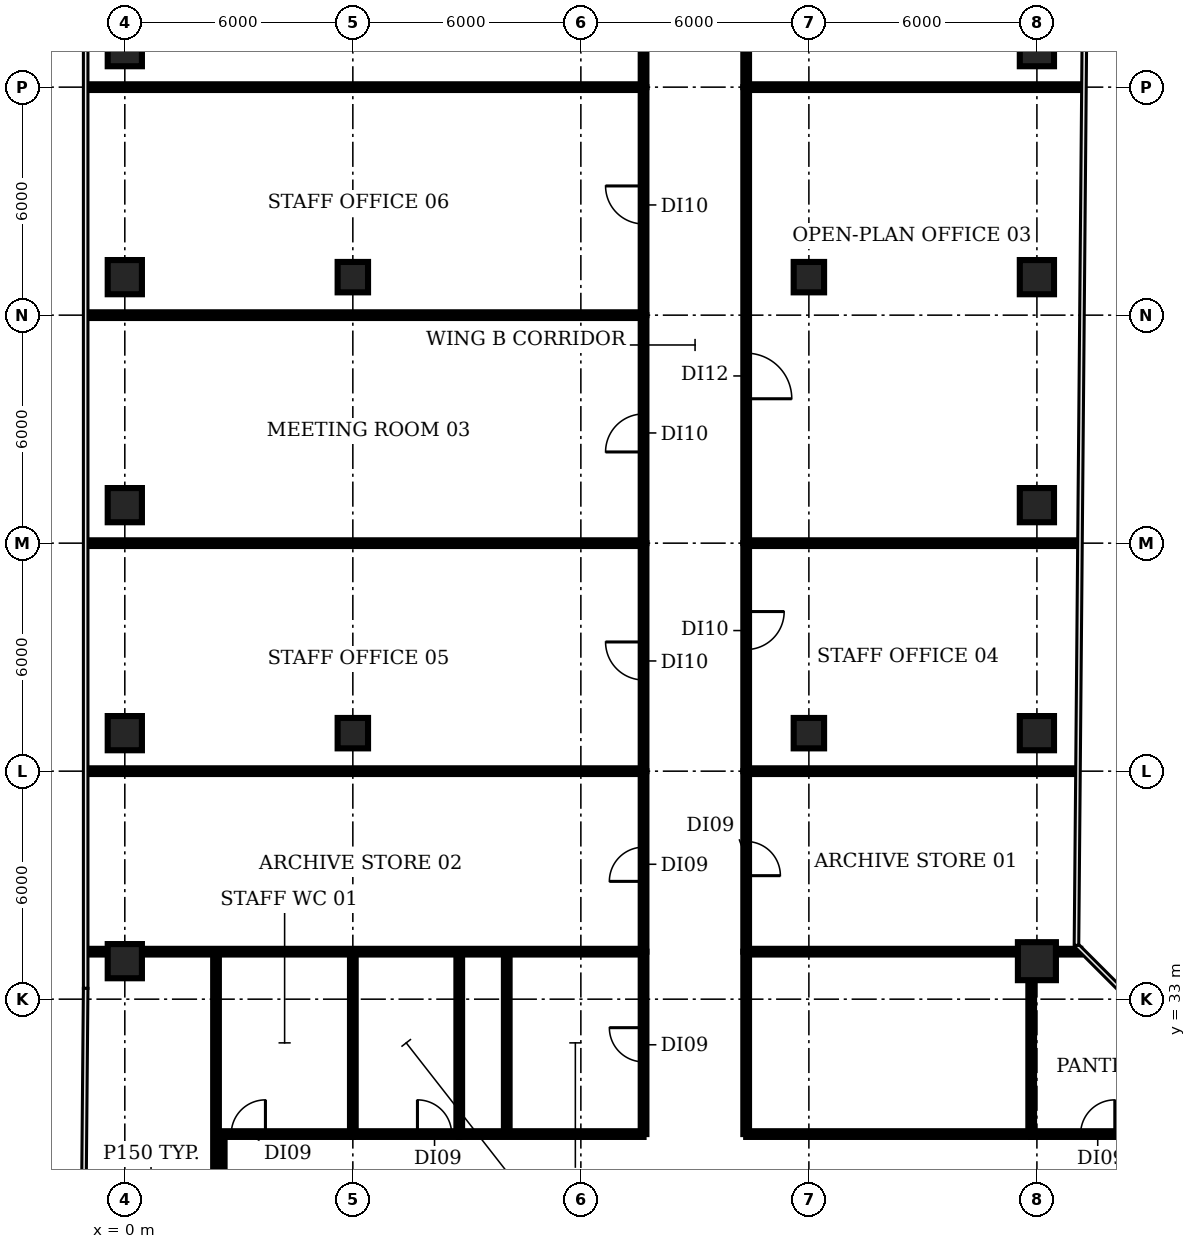
"""IFC4 building model, lengths in metres.
Left out: names, types, materials, properties, quantities, classifications, styles, units other than length and angle.
Written with IfcOpenShell. Run it as: python <this file> out.ifc"""

import sys

from ifc_helpers import new_model, si_unit, direction, frame, frame_2d, origin, origin_2d, place, context, subcontext, project, spatial, rectangle, circle, extrude, element, fill, save


model = new_model("IFC4")
c1 = context("Model", 3, precision=1e-05, world=origin(), true_north=direction((0.0, 1.0)))
c2 = subcontext(c1, "Body", "Model", "MODEL_VIEW")
j1 = project(units=[si_unit("LENGTHUNIT", "METRE"), si_unit("PLANEANGLEUNIT", "RADIAN")], contexts=[c1])
p1 = place(None, origin())
s1 = spatial("IfcSite", under=j1, at=p1, CompositionType="ELEMENT")
p2 = place(p1, origin())
s2 = spatial("IfcBuilding", under=s1, at=p2, CompositionType="ELEMENT")
p3 = place(p2, frame((0.0, 0.0, 113.0)))
s3 = spatial("IfcBuildingStorey", under=s2, at=p3, CompositionType="ELEMENT", Elevation=113.0)
for number, where, z_axis, x_axis in (
    (1, (0.0, 34.0, 0.0), (0.0, 0.0, 1.0), (1.0, 0.0, 0.0)),
    (2, (0.0, 40.0, 0.0), (0.0, 0.0, 1.0), (1.0, 0.0, 0.0)),
    (3, (0.0, 46.0, 0.0), (0.0, 0.0, 1.0), (1.0, 0.0, 0.0)),
    (4, (0.0, 52.0, 0.0), (0.0, 0.0, 1.0), (1.0, 0.0, 0.0)),
    (5, (0.0, 58.0, 0.0), (0.0, 0.0, 1.0), (1.0, 0.0, 0.0)),
):
    element("IfcColumn", number, at=place(p3, frame(where, z_axis=z_axis, x_axis=x_axis)), inside=s3, PredefinedType="COLUMN", context=c2, shape_type="SweptSolid", body=[
        extrude(rectangle(XDim=0.9, YDim=0.9, at=origin_2d()), origin(), (0.0, 0.0, 1.0), 3.85),
    ])
for number, where, z_axis, x_axis in (
    (6, (6.0, 40.0, 0.0), (0.0, 0.0, 1.0), (1.0, 0.0, 0.0)),
    (7, (6.0, 52.0, 0.0), (0.0, 0.0, 1.0), (1.0, 0.0, 0.0)),
    (8, (18.0, 40.0, 0.0), (0.0, 0.0, 1.0), (1.0, 0.0, 0.0)),
    (9, (18.0, 52.0, 0.0), (0.0, 0.0, 1.0), (1.0, 0.0, 0.0)),
):
    element("IfcColumn", number, at=place(p3, frame(where, z_axis=z_axis, x_axis=x_axis)), inside=s3, PredefinedType="COLUMN", context=c2, shape_type="SweptSolid", body=[
        extrude(rectangle(XDim=0.8, YDim=0.8, at=origin_2d()), origin(), (0.0, 0.0, 1.0), 3.85),
    ])
p4 = place(p3, frame((24.0, 34.0, 0.0), z_axis=(0.0, 0.0, 1.0), x_axis=(1.0, 0.0, 0.0)))
e10 = element("IfcColumn", 10, at=p4, inside=s3, PredefinedType="COLUMN", context=c2, shape_type="SweptSolid", body=[
    extrude(circle(Radius=0.5, at=origin_2d()), origin(), (0.0, 0.0, 1.0), 3.85),
])
for number, where, z_axis, x_axis in (
    (11, (24.0, 40.0, 0.0), (0.0, 0.0, 1.0), (1.0, 0.0, 0.0)),
    (12, (24.0, 46.0, 0.0), (0.0, 0.0, 1.0), (1.0, 0.0, 0.0)),
    (13, (24.0, 52.0, 0.0), (0.0, 0.0, 1.0), (1.0, 0.0, 0.0)),
    (14, (24.0, 58.0, 0.0), (0.0, 0.0, 1.0), (1.0, 0.0, 0.0)),
):
    element("IfcColumn", number, at=place(p3, frame(where, z_axis=z_axis, x_axis=x_axis)), inside=s3, PredefinedType="COLUMN", context=c2, shape_type="SweptSolid", body=[
        extrude(rectangle(XDim=0.9, YDim=0.9, at=origin_2d()), origin(), (0.0, 0.0, 1.0), 3.85),
    ])
for number, where, z_axis, x_axis in (
    (15, (-0.98, 34.25, 0.0), (0.0, 0.0, 1.0), (1.0, 0.0, 0.0)),
    (16, (-0.98, 39.0, 0.0), (0.0, 0.0, 1.0), (1.0, 0.0, 0.0)),
    (17, (-0.98, 45.0, 0.0), (0.0, 0.0, 1.0), (1.0, 0.0, 0.0)),
    (18, (-0.98, 51.0, 0.0), (0.0, 0.0, 1.0), (1.0, 0.0, 0.0)),
    (19, (-0.98, 57.0, 0.0), (0.0, 0.0, 1.0), (1.0, 0.0, 0.0)),
):
    element("IfcWall", number, at=place(p3, frame(where, z_axis=z_axis, x_axis=x_axis)), inside=s3, PredefinedType="PARTITIONING", context=c2, shape_type="SweptSolid", body=[
        extrude(rectangle(XDim=14.63, YDim=0.15, at=frame_2d((7.315, 0.0))), origin(), (0.0, 0.0, 1.0), 2.83),
    ])
p5 = place(p3, frame((2.4, 28.25, 0.0), z_axis=(0.0, 0.0, 1.0), x_axis=(0.0, 1.0, 0.0)))
e20 = element("IfcWall", 20, at=p5, inside=s3, PredefinedType="PARTITIONING", context=c2, shape_type="SweptSolid", body=[
    extrude(rectangle(XDim=6.0, YDim=0.15, at=frame_2d((3.0, 0.0))), origin(), (0.0, 0.0, 1.0), 2.83),
])
p6 = place(p3, frame((2.55, 25.55, 0.0), z_axis=(0.0, 0.0, 1.0), x_axis=(0.0, 1.0, 0.0)))
e21 = element("IfcWall", 21, at=p6, inside=s3, PredefinedType="PARTITIONING", context=c2, shape_type="SweptSolid", body=[
    extrude(rectangle(XDim=3.9, YDim=0.15, at=frame_2d((1.95, 0.0))), origin(), (0.0, 0.0, 1.0), 2.83),
])
p7 = place(p3, frame((2.55, 29.45, 0.0), z_axis=(0.0, 0.0, 1.0), x_axis=(1.0, 0.0, 0.0)))
e22 = element("IfcWall", 22, at=p7, inside=s3, PredefinedType="PARTITIONING", context=c2, shape_type="SweptSolid", body=[
    extrude(rectangle(XDim=3.45, YDim=0.15, at=frame_2d((1.725, 0.0))), origin(), (0.0, 0.0, 1.0), 2.83),
])
p8 = place(p7, frame((0.25, 0.0, 0.0)))
e23 = element("IfcOpeningElement", 23, at=p8, cuts=e22, PredefinedType="OPENING", context=c2, shape_type="SweptSolid", body=[
    extrude(rectangle(XDim=0.9, YDim=2.1, at=frame_2d((0.45, 1.05))), frame((0.0, 0.085, 0.0), z_axis=(0.0, -1.0, 0.0), x_axis=(1.0, 0.0, 0.0)), (0.0, 0.0, 1.0), 0.17),
])
p9 = place(p3, frame((6.0, 29.45, 0.0), z_axis=(0.0, 0.0, 1.0), x_axis=(0.0, 1.0, 0.0)))
e24 = element("IfcWall", 24, at=p9, inside=s3, PredefinedType="PARTITIONING", context=c2, shape_type="SweptSolid", body=[
    extrude(rectangle(XDim=4.8, YDim=0.15, at=frame_2d((2.4, 0.0))), origin(), (0.0, 0.0, 1.0), 2.83),
])
p10 = place(p3, frame((6.0, 29.45, 0.0), z_axis=(0.0, 0.0, 1.0), x_axis=(1.0, 0.0, 0.0)))
e25 = element("IfcWall", 25, at=p10, inside=s3, PredefinedType="PARTITIONING", context=c2, shape_type="SweptSolid", body=[
    extrude(rectangle(XDim=2.8, YDim=0.15, at=frame_2d((1.4, 0.0))), origin(), (0.0, 0.0, 1.0), 2.83),
])
p11 = place(p10, frame((1.7, 0.0, 0.0)))
e26 = element("IfcOpeningElement", 26, at=p11, cuts=e25, PredefinedType="OPENING", context=c2, shape_type="SweptSolid", body=[
    extrude(rectangle(XDim=0.9, YDim=2.1, at=frame_2d((0.45, 1.05))), frame((0.0, 0.085, 0.0), z_axis=(0.0, -1.0, 0.0), x_axis=(1.0, 0.0, 0.0)), (0.0, 0.0, 1.0), 0.17),
])
p12 = place(p3, frame((8.8, 29.45, 0.0), z_axis=(0.0, 0.0, 1.0), x_axis=(0.0, 1.0, 0.0)))
e27 = element("IfcWall", 27, at=p12, inside=s3, PredefinedType="PARTITIONING", context=c2, shape_type="SweptSolid", body=[
    extrude(rectangle(XDim=4.8, YDim=0.15, at=frame_2d((2.4, 0.0))), origin(), (0.0, 0.0, 1.0), 2.83),
])
p13 = place(p3, frame((8.8, 29.45, 0.0), z_axis=(0.0, 0.0, 1.0), x_axis=(1.0, 0.0, 0.0)))
e28 = element("IfcWall", 28, at=p13, inside=s3, PredefinedType="PARTITIONING", context=c2, shape_type="SweptSolid", body=[
    extrude(rectangle(XDim=4.85, YDim=0.15, at=frame_2d((2.425, 0.0))), origin(), (0.0, 0.0, 1.0), 2.83),
])
p14 = place(p3, frame((10.05, 29.45, 0.0), z_axis=(0.0, 0.0, 1.0), x_axis=(0.0, 1.0, 0.0)))
e29 = element("IfcWall", 29, at=p14, inside=s3, PredefinedType="PARTITIONING", context=c2, shape_type="SweptSolid", body=[
    extrude(rectangle(XDim=4.8, YDim=0.15, at=frame_2d((2.4, 0.0))), origin(), (0.0, 0.0, 1.0), 2.83),
])
p15 = place(p3, frame((13.65, 29.45, 0.0), z_axis=(0.0, 0.0, 1.0), x_axis=(0.0, 1.0, 0.0)))
e30 = element("IfcWall", 30, at=p15, inside=s3, PredefinedType="PARTITIONING", context=c2, shape_type="SweptSolid", body=[
    extrude(rectangle(XDim=4.8, YDim=0.15, at=frame_2d((2.4, 0.0))), origin(), (0.0, 0.0, 1.0), 2.83),
])
p16 = place(p15, frame((1.9, 0.0, 0.0)))
e31 = element("IfcOpeningElement", 31, at=p16, cuts=e30, PredefinedType="OPENING", context=c2, shape_type="SweptSolid", body=[
    extrude(rectangle(XDim=0.9, YDim=2.1, at=frame_2d((0.45, 1.05))), frame((0.0, 0.085, 0.0), z_axis=(0.0, -1.0, 0.0), x_axis=(1.0, 0.0, 0.0)), (0.0, 0.0, 1.0), 0.17),
])
p17 = place(p3, frame((13.65, 34.25, 0.0), z_axis=(0.0, 0.0, 1.0), x_axis=(0.0, 1.0, 0.0)))
e32 = element("IfcWall", 32, at=p17, inside=s3, PredefinedType="PARTITIONING", context=c2, shape_type="SweptSolid", body=[
    extrude(rectangle(XDim=4.75, YDim=0.15, at=frame_2d((2.375, 0.0))), origin(), (0.0, 0.0, 1.0), 2.83),
])
p18 = place(p17, frame((1.85, 0.0, 0.0)))
e33 = element("IfcOpeningElement", 33, at=p18, cuts=e32, PredefinedType="OPENING", context=c2, shape_type="SweptSolid", body=[
    extrude(rectangle(XDim=0.9, YDim=2.1, at=frame_2d((0.45, 1.05))), frame((0.0, 0.085, 0.0), z_axis=(0.0, -1.0, 0.0), x_axis=(1.0, 0.0, 0.0)), (0.0, 0.0, 1.0), 0.17),
])
p19 = place(p3, frame((13.65, 39.0, 0.0), z_axis=(0.0, 0.0, 1.0), x_axis=(0.0, 1.0, 0.0)))
e34 = element("IfcWall", 34, at=p19, inside=s3, PredefinedType="PARTITIONING", context=c2, shape_type="SweptSolid", body=[
    extrude(rectangle(XDim=6.0, YDim=0.15, at=frame_2d((3.0, 0.0))), origin(), (0.0, 0.0, 1.0), 2.83),
])
p20 = place(p19, frame((2.4, 0.0, 0.0)))
e35 = element("IfcOpeningElement", 35, at=p20, cuts=e34, PredefinedType="OPENING", context=c2, shape_type="SweptSolid", body=[
    extrude(rectangle(XDim=1.0, YDim=2.1, at=frame_2d((0.5, 1.05))), frame((0.0, 0.085, 0.0), z_axis=(0.0, -1.0, 0.0), x_axis=(1.0, 0.0, 0.0)), (0.0, 0.0, 1.0), 0.17),
])
p21 = place(p3, frame((13.65, 45.0, 0.0), z_axis=(0.0, 0.0, 1.0), x_axis=(0.0, 1.0, 0.0)))
e36 = element("IfcWall", 36, at=p21, inside=s3, PredefinedType="PARTITIONING", context=c2, shape_type="SweptSolid", body=[
    extrude(rectangle(XDim=6.0, YDim=0.15, at=frame_2d((3.0, 0.0))), origin(), (0.0, 0.0, 1.0), 2.83),
])
p22 = place(p21, frame((2.4, 0.0, 0.0)))
e37 = element("IfcOpeningElement", 37, at=p22, cuts=e36, PredefinedType="OPENING", context=c2, shape_type="SweptSolid", body=[
    extrude(rectangle(XDim=1.0, YDim=2.1, at=frame_2d((0.5, 1.05))), frame((0.0, 0.085, 0.0), z_axis=(0.0, -1.0, 0.0), x_axis=(1.0, 0.0, 0.0)), (0.0, 0.0, 1.0), 0.17),
])
p23 = place(p3, frame((13.65, 51.0, 0.0), z_axis=(0.0, 0.0, 1.0), x_axis=(0.0, 1.0, 0.0)))
e38 = element("IfcWall", 38, at=p23, inside=s3, PredefinedType="PARTITIONING", context=c2, shape_type="SweptSolid", body=[
    extrude(rectangle(XDim=6.0, YDim=0.15, at=frame_2d((3.0, 0.0))), origin(), (0.0, 0.0, 1.0), 2.83),
])
p24 = place(p23, frame((2.4, 0.0, 0.0)))
e39 = element("IfcOpeningElement", 39, at=p24, cuts=e38, PredefinedType="OPENING", context=c2, shape_type="SweptSolid", body=[
    extrude(rectangle(XDim=1.0, YDim=2.1, at=frame_2d((0.5, 1.05))), frame((0.0, 0.085, 0.0), z_axis=(0.0, -1.0, 0.0), x_axis=(1.0, 0.0, 0.0)), (0.0, 0.0, 1.0), 0.17),
])
p25 = place(p3, frame((13.65, 57.0, 0.0), z_axis=(0.0, 0.0, 1.0), x_axis=(0.0, 1.0, 0.0)))
e40 = element("IfcWall", 40, at=p25, inside=s3, PredefinedType="PARTITIONING", context=c2, shape_type="SweptSolid", body=[
    extrude(rectangle(XDim=14.078, YDim=0.15, at=frame_2d((7.039, 0.0))), origin(), (0.0, 0.0, 1.0), 2.83),
])
p26 = place(p25, frame((6.27, 0.0, 0.0)))
e41 = element("IfcOpeningElement", 41, at=p26, cuts=e40, PredefinedType="OPENING", context=c2, shape_type="SweptSolid", body=[
    extrude(rectangle(XDim=1.2, YDim=2.1, at=frame_2d((0.6, 1.05))), frame((0.0, 0.085, 0.0), z_axis=(0.0, -1.0, 0.0), x_axis=(1.0, 0.0, 0.0)), (0.0, 0.0, 1.0), 0.17),
])
p27 = place(p3, frame((16.35, 29.45, 0.0), z_axis=(0.0, 0.0, 1.0), x_axis=(0.0, 1.0, 0.0)))
e42 = element("IfcWall", 42, at=p27, inside=s3, PredefinedType="PARTITIONING", context=c2, shape_type="SweptSolid", body=[
    extrude(rectangle(XDim=4.8, YDim=0.15, at=frame_2d((2.4, 0.0))), origin(), (0.0, 0.0, 1.0), 2.83),
])
p28 = place(p3, frame((16.35, 29.45, 0.0), z_axis=(0.0, 0.0, 1.0), x_axis=(1.0, 0.0, 0.0)))
e43 = element("IfcWall", 43, at=p28, inside=s3, PredefinedType="PARTITIONING", context=c2, shape_type="SweptSolid", body=[
    extrude(rectangle(XDim=7.5, YDim=0.15, at=frame_2d((3.75, 0.0))), origin(), (0.0, 0.0, 1.0), 2.83),
])
p29 = place(p3, frame((16.35, 34.25, 0.0), z_axis=(0.0, 0.0, 1.0), x_axis=(1.0, 0.0, 0.0)))
e44 = element("IfcWall", 44, at=p29, inside=s3, PredefinedType="PARTITIONING", context=c2, shape_type="SweptSolid", body=[
    extrude(rectangle(XDim=8.79, YDim=0.15, at=frame_2d((4.395, 0.0))), origin(), (0.0, 0.0, 1.0), 2.83),
])
p30 = place(p3, frame((16.35, 39.0, 0.0), z_axis=(0.0, 0.0, 1.0), x_axis=(0.0, -1.0, 0.0)))
e45 = element("IfcWall", 45, at=p30, inside=s3, PredefinedType="PARTITIONING", context=c2, shape_type="SweptSolid", body=[
    extrude(rectangle(XDim=4.75, YDim=0.15, at=frame_2d((2.375, 0.0))), origin(), (0.0, 0.0, 1.0), 2.83),
])
p31 = place(p30, frame((1.85, 0.0, 0.0)))
e46 = element("IfcOpeningElement", 46, at=p31, cuts=e45, PredefinedType="OPENING", context=c2, shape_type="SweptSolid", body=[
    extrude(rectangle(XDim=0.9, YDim=2.1, at=frame_2d((0.45, 1.05))), frame((0.0, 0.085, 0.0), z_axis=(0.0, -1.0, 0.0), x_axis=(1.0, 0.0, 0.0)), (0.0, 0.0, 1.0), 0.17),
])
p32 = place(p3, frame((16.35, 39.0, 0.0), z_axis=(0.0, 0.0, 1.0), x_axis=(1.0, 0.0, 0.0)))
e47 = element("IfcWall", 47, at=p32, inside=s3, PredefinedType="PARTITIONING", context=c2, shape_type="SweptSolid", body=[
    extrude(rectangle(XDim=8.68, YDim=0.15, at=frame_2d((4.34, 0.0))), origin(), (0.0, 0.0, 1.0), 2.83),
])
p33 = place(p3, frame((16.35, 45.0, 0.0), z_axis=(0.0, 0.0, 1.0), x_axis=(0.0, -1.0, 0.0)))
e48 = element("IfcWall", 48, at=p33, inside=s3, PredefinedType="PARTITIONING", context=c2, shape_type="SweptSolid", body=[
    extrude(rectangle(XDim=6.0, YDim=0.15, at=frame_2d((3.0, 0.0))), origin(), (0.0, 0.0, 1.0), 2.83),
])
p34 = place(p33, frame((1.8, 0.0, 0.0)))
e49 = element("IfcOpeningElement", 49, at=p34, cuts=e48, PredefinedType="OPENING", context=c2, shape_type="SweptSolid", body=[
    extrude(rectangle(XDim=1.0, YDim=2.1, at=frame_2d((0.5, 1.05))), frame((0.0, 0.085, 0.0), z_axis=(0.0, -1.0, 0.0), x_axis=(1.0, 0.0, 0.0)), (0.0, 0.0, 1.0), 0.17),
])
p35 = place(p3, frame((16.35, 45.0, 0.0), z_axis=(0.0, 0.0, 1.0), x_axis=(1.0, 0.0, 0.0)))
e50 = element("IfcWall", 50, at=p35, inside=s3, PredefinedType="PARTITIONING", context=c2, shape_type="SweptSolid", body=[
    extrude(rectangle(XDim=8.73, YDim=0.15, at=frame_2d((4.365, 0.0))), origin(), (0.0, 0.0, 1.0), 2.83),
])
p36 = place(p3, frame((16.35, 57.0, 0.0), z_axis=(0.0, 0.0, 1.0), x_axis=(0.0, -1.0, 0.0)))
e51 = element("IfcWall", 51, at=p36, inside=s3, PredefinedType="PARTITIONING", context=c2, shape_type="SweptSolid", body=[
    extrude(rectangle(XDim=12.0, YDim=0.15, at=frame_2d((6.0, 0.0))), origin(), (0.0, 0.0, 1.0), 2.83),
])
p37 = place(p36, frame((7.0, 0.0, 0.0)))
e52 = element("IfcOpeningElement", 52, at=p37, cuts=e51, PredefinedType="OPENING", context=c2, shape_type="SweptSolid", body=[
    extrude(rectangle(XDim=1.2, YDim=2.1, at=frame_2d((0.6, 1.05))), frame((0.0, 0.085, 0.0), z_axis=(0.0, -1.0, 0.0), x_axis=(1.0, 0.0, 0.0)), (0.0, 0.0, 1.0), 0.17),
])
p38 = place(p3, frame((16.35, 57.0, 0.0), z_axis=(0.0, 0.0, 1.0), x_axis=(1.0, 0.0, 0.0)))
e53 = element("IfcWall", 53, at=p38, inside=s3, PredefinedType="PARTITIONING", context=c2, shape_type="SweptSolid", body=[
    extrude(rectangle(XDim=8.84, YDim=0.15, at=frame_2d((4.42, 0.0))), origin(), (0.0, 0.0, 1.0), 2.83),
])
p39 = place(p3, frame((16.35, 70.951, 0.0), z_axis=(0.0, 0.0, 1.0), x_axis=(0.0, -1.0, 0.0)))
e54 = element("IfcWall", 54, at=p39, inside=s3, PredefinedType="PARTITIONING", context=c2, shape_type="SweptSolid", body=[
    extrude(rectangle(XDim=13.951, YDim=0.15, at=frame_2d((6.975, 0.0))), origin(), (0.0, 0.0, 1.0), 2.83),
])
p40 = place(p39, frame((9.151, 0.0, 0.0)))
e55 = element("IfcOpeningElement", 55, at=p40, cuts=e54, PredefinedType="OPENING", context=c2, shape_type="SweptSolid", body=[
    extrude(rectangle(XDim=1.0, YDim=2.1, at=frame_2d((0.5, 1.05))), frame((0.0, 0.085, 0.0), z_axis=(0.0, -1.0, 0.0), x_axis=(1.0, 0.0, 0.0)), (0.0, 0.0, 1.0), 0.17),
])
p41 = place(p3, frame((23.85, 29.45, 0.0), z_axis=(0.0, 0.0, 1.0), x_axis=(0.0, 1.0, 0.0)))
e56 = element("IfcWall", 56, at=p41, inside=s3, PredefinedType="PARTITIONING", context=c2, shape_type="SweptSolid", body=[
    extrude(rectangle(XDim=4.8, YDim=0.15, at=frame_2d((2.4, 0.0))), origin(), (0.0, 0.0, 1.0), 2.83),
])
p42 = place(p3, frame((23.85, 29.45, 0.0), z_axis=(0.0, 0.0, 1.0), x_axis=(1.0, 0.0, 0.0)))
e57 = element("IfcWall", 57, at=p42, inside=s3, PredefinedType="PARTITIONING", context=c2, shape_type="SweptSolid", body=[
    extrude(rectangle(XDim=3.6, YDim=0.15, at=frame_2d((1.8, 0.0))), origin(), (0.0, 0.0, 1.0), 2.83),
])
p43 = place(p42, frame((1.3, 0.0, 0.0)))
e58 = element("IfcOpeningElement", 58, at=p43, cuts=e57, PredefinedType="OPENING", context=c2, shape_type="SweptSolid", body=[
    extrude(rectangle(XDim=0.9, YDim=2.1, at=frame_2d((0.45, 1.05))), frame((0.0, 0.085, 0.0), z_axis=(0.0, -1.0, 0.0), x_axis=(1.0, 0.0, 0.0)), (0.0, 0.0, 1.0), 0.17),
])
p44 = place(p8, origin())
e59 = element("IfcDoor", 59, at=p44, inside=s3, OperationType="SINGLE_SWING_RIGHT", PredefinedType="DOOR", context=c2, shape_type="SweptSolid", body=[
    extrude(rectangle(XDim=0.9, YDim=2.1, at=frame_2d((0.45, 1.05))), frame((0.0, 0.025, 0.0), z_axis=(0.0, -1.0, 0.0), x_axis=(1.0, 0.0, 0.0)), (0.0, 0.0, 1.0), 0.05),
])
fill(e23, e59)
p45 = place(p11, origin())
e60 = element("IfcDoor", 60, at=p45, inside=s3, OperationType="SINGLE_SWING_LEFT", PredefinedType="DOOR", context=c2, shape_type="SweptSolid", body=[
    extrude(rectangle(XDim=0.9, YDim=2.1, at=frame_2d((0.45, 1.05))), frame((0.0, 0.025, 0.0), z_axis=(0.0, -1.0, 0.0), x_axis=(1.0, 0.0, 0.0)), (0.0, 0.0, 1.0), 0.05),
])
fill(e26, e60)
p46 = place(p16, origin())
e61 = element("IfcDoor", 61, at=p46, inside=s3, OperationType="SINGLE_SWING_RIGHT", PredefinedType="DOOR", context=c2, shape_type="SweptSolid", body=[
    extrude(rectangle(XDim=0.9, YDim=2.1, at=frame_2d((0.45, 1.05))), frame((0.0, 0.025, 0.0), z_axis=(0.0, -1.0, 0.0), x_axis=(1.0, 0.0, 0.0)), (0.0, 0.0, 1.0), 0.05),
])
fill(e31, e61)
p47 = place(p18, origin())
e62 = element("IfcDoor", 62, at=p47, inside=s3, OperationType="SINGLE_SWING_LEFT", PredefinedType="DOOR", context=c2, shape_type="SweptSolid", body=[
    extrude(rectangle(XDim=0.9, YDim=2.1, at=frame_2d((0.45, 1.05))), frame((0.0, 0.025, 0.0), z_axis=(0.0, -1.0, 0.0), x_axis=(1.0, 0.0, 0.0)), (0.0, 0.0, 1.0), 0.05),
])
fill(e33, e62)
p48 = place(p20, origin())
e63 = element("IfcDoor", 63, at=p48, inside=s3, OperationType="SINGLE_SWING_RIGHT", PredefinedType="DOOR", context=c2, shape_type="SweptSolid", body=[
    extrude(rectangle(XDim=1.0, YDim=2.1, at=frame_2d((0.5, 1.05))), frame((0.0, 0.025, 0.0), z_axis=(0.0, -1.0, 0.0), x_axis=(1.0, 0.0, 0.0)), (0.0, 0.0, 1.0), 0.05),
])
fill(e35, e63)
p49 = place(p22, origin())
e64 = element("IfcDoor", 64, at=p49, inside=s3, OperationType="SINGLE_SWING_LEFT", PredefinedType="DOOR", context=c2, shape_type="SweptSolid", body=[
    extrude(rectangle(XDim=1.0, YDim=2.1, at=frame_2d((0.5, 1.05))), frame((0.0, 0.025, 0.0), z_axis=(0.0, -1.0, 0.0), x_axis=(1.0, 0.0, 0.0)), (0.0, 0.0, 1.0), 0.05),
])
fill(e37, e64)
p50 = place(p24, origin())
e65 = element("IfcDoor", 65, at=p50, inside=s3, OperationType="SINGLE_SWING_RIGHT", PredefinedType="DOOR", context=c2, shape_type="SweptSolid", body=[
    extrude(rectangle(XDim=1.0, YDim=2.1, at=frame_2d((0.5, 1.05))), frame((0.0, 0.025, 0.0), z_axis=(0.0, -1.0, 0.0), x_axis=(1.0, 0.0, 0.0)), (0.0, 0.0, 1.0), 0.05),
])
fill(e39, e65)
p51 = place(p31, origin())
e66 = element("IfcDoor", 66, at=p51, inside=s3, OperationType="SINGLE_SWING_RIGHT", PredefinedType="DOOR", context=c2, shape_type="SweptSolid", body=[
    extrude(rectangle(XDim=0.9, YDim=2.1, at=frame_2d((0.45, 1.05))), frame((0.0, 0.025, 0.0), z_axis=(0.0, -1.0, 0.0), x_axis=(1.0, 0.0, 0.0)), (0.0, 0.0, 1.0), 0.05),
])
fill(e46, e66)
p52 = place(p34, origin())
e67 = element("IfcDoor", 67, at=p52, inside=s3, OperationType="SINGLE_SWING_LEFT", PredefinedType="DOOR", context=c2, shape_type="SweptSolid", body=[
    extrude(rectangle(XDim=1.0, YDim=2.1, at=frame_2d((0.5, 1.05))), frame((0.0, 0.025, 0.0), z_axis=(0.0, -1.0, 0.0), x_axis=(1.0, 0.0, 0.0)), (0.0, 0.0, 1.0), 0.05),
])
fill(e49, e67)
p53 = place(p37, origin())
e68 = element("IfcDoor", 68, at=p53, inside=s3, OperationType="SINGLE_SWING_RIGHT", PredefinedType="DOOR", context=c2, shape_type="SweptSolid", body=[
    extrude(rectangle(XDim=1.2, YDim=2.1, at=frame_2d((0.6, 1.05))), frame((0.0, 0.025, 0.0), z_axis=(0.0, -1.0, 0.0), x_axis=(1.0, 0.0, 0.0)), (0.0, 0.0, 1.0), 0.05),
])
fill(e52, e68)
p54 = place(p43, origin())
e69 = element("IfcDoor", 69, at=p54, inside=s3, OperationType="SINGLE_SWING_RIGHT", PredefinedType="DOOR", context=c2, shape_type="SweptSolid", body=[
    extrude(rectangle(XDim=0.9, YDim=2.1, at=frame_2d((0.45, 1.05))), frame((0.0, 0.025, 0.0), z_axis=(0.0, -1.0, 0.0), x_axis=(1.0, 0.0, 0.0)), (0.0, 0.0, 1.0), 0.05),
])
fill(e58, e69)
save(model, sys.argv[1])
